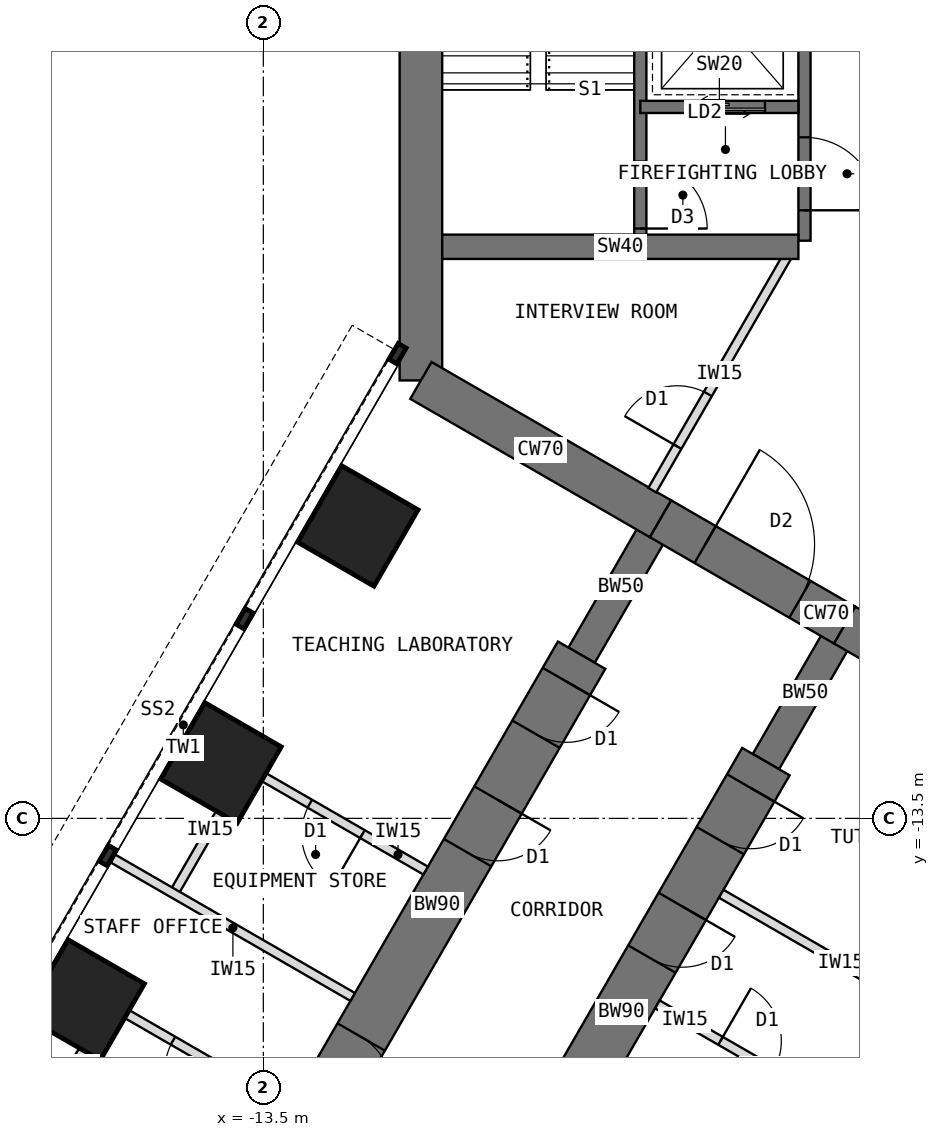
"""IFC4 building model, lengths in metres.
Left out: names, types, materials, properties, quantities, classifications, styles, units other than length and angle.
Written with IfcOpenShell. Run it as: python <this file> out.ifc"""

import sys

from ifc_helpers import new_model, si_unit, direction, frame, frame_2d, origin, origin_2d, place, context, subcontext, project, spatial, rectangle, extrude, element, fill, save


model = new_model("IFC4")
c1 = context("Model", 3, precision=1e-05, world=origin(), true_north=direction((0.0, 1.0)))
c2 = subcontext(c1, "Body", "Model", "MODEL_VIEW")
j1 = project(units=[si_unit("LENGTHUNIT", "METRE"), si_unit("PLANEANGLEUNIT", "RADIAN")], contexts=[c1])
p1 = place(None, origin())
s1 = spatial("IfcSite", under=j1, at=p1, CompositionType="ELEMENT")
p2 = place(p1, origin())
s2 = spatial("IfcBuilding", under=s1, at=p2, CompositionType="ELEMENT")
p3 = place(p2, frame((0.0, 0.0, 64.5)))
s3 = spatial("IfcBuildingStorey", under=s2, at=p3, CompositionType="ELEMENT", Elevation=64.5)
p4 = place(p3, frame((-10.908, 6.298, 0.0), z_axis=(0.0, 0.0, 1.0), x_axis=(0.0, -1.0, 0.0)))
e1 = element("IfcWall", 1, at=p4, inside=s3, PredefinedType="SHEAR", context=c2, shape_type="SweptSolid", body=[
    extrude(rectangle(XDim=12.596, YDim=0.7, at=frame_2d((6.298, 0.0))), origin(), (0.0, 0.0, 1.0), 4.0),
])
p5 = place(p3, frame((-10.908, -6.298, 0.0), z_axis=(0.0, 0.0, 1.0), x_axis=(0.866034513004, -0.499984222037, 0.0)))
e2 = element("IfcWall", 2, at=p5, inside=s3, PredefinedType="SHEAR", context=c2, shape_type="SweptSolid", body=[
    extrude(rectangle(XDim=4.548, YDim=0.7, at=frame_2d((2.274, 0.0))), origin(), (0.0, 0.0, 1.0), 4.0),
])
p6 = place(p3, frame((-6.97, -8.572, 0.0), z_axis=(0.0, 0.0, 1.0), x_axis=(0.866019471182, -0.500010275428, 0.0)))
e3 = element("IfcWall", 3, at=p6, inside=s3, PredefinedType="SHEAR", context=c2, shape_type="SweptSolid", body=[
    extrude(rectangle(XDim=3.5, YDim=0.7, at=frame_2d((1.75, 0.0))), origin(), (0.0, 0.0, 1.0), 4.0),
])
p7 = place(p6, frame((0.85, 0.0, 0.0)))
e4 = element("IfcOpeningElement", 4, at=p7, cuts=e3, PredefinedType="OPENING", context=c2, shape_type="SweptSolid", body=[
    extrude(rectangle(XDim=1.8, YDim=2.1, at=frame_2d((0.9, 1.05))), frame((0.0, 0.36, 0.0), z_axis=(0.0, -1.0, 0.0), x_axis=(1.0, 0.0, 0.0)), (0.0, 0.0, 1.0), 0.72),
])
p8 = place(p3, frame((-3.939, -10.322, 0.0), z_axis=(0.0, 0.0, 1.0), x_axis=(0.866011268655, -0.500024481964, 0.0)))
e5 = element("IfcWall", 5, at=p8, inside=s3, PredefinedType="SHEAR", context=c2, shape_type="SweptSolid", body=[
    extrude(rectangle(XDim=4.548, YDim=0.7, at=frame_2d((2.274, 0.0))), origin(), (0.0, 0.0, 1.0), 4.0),
])
p9 = place(p3, frame((-3.939, -10.322, 0.0), z_axis=(0.0, 0.0, 1.0), x_axis=(-0.499918158782, -0.866072649678, 0.0)))
e6 = element("IfcWall", 6, at=p9, inside=s3, PredefinedType="SHEAR", context=c2, shape_type="SweptSolid", body=[
    extrude(rectangle(XDim=2.592, YDim=0.5, at=frame_2d((1.296, 0.0))), origin(), (0.0, 0.0, 1.0), 4.0),
])
p10 = place(p3, frame((-5.234, -12.566, 0.0), z_axis=(0.0, 0.0, 1.0), x_axis=(-0.499997557548, -0.86602681393, 0.0)))
e7 = element("IfcWall", 7, at=p10, inside=s3, PredefinedType="SHEAR", context=c2, shape_type="SweptSolid", body=[
    extrude(rectangle(XDim=9.5, YDim=0.9, at=frame_2d((4.75, 0.0))), origin(), (0.0, 0.0, 1.0), 4.0),
])
p11 = place(p10, frame((0.5, 0.0, 0.0)))
e8 = element("IfcOpeningElement", 8, at=p11, cuts=e7, PredefinedType="OPENING", context=c2, shape_type="SweptSolid", body=[
    extrude(rectangle(XDim=1.0, YDim=2.1, at=frame_2d((0.5, 1.05))), frame((0.0, 0.46, 0.0), z_axis=(0.0, -1.0, 0.0), x_axis=(1.0, 0.0, 0.0)), (0.0, 0.0, 1.0), 0.92),
])
p12 = place(p10, frame((2.75, 0.0, 0.0)))
e9 = element("IfcOpeningElement", 9, at=p12, cuts=e7, PredefinedType="OPENING", context=c2, shape_type="SweptSolid", body=[
    extrude(rectangle(XDim=1.0, YDim=2.1, at=frame_2d((0.5, 1.05))), frame((0.0, 0.46, 0.0), z_axis=(0.0, -1.0, 0.0), x_axis=(1.0, 0.0, 0.0)), (0.0, 0.0, 1.0), 0.92),
])
p13 = place(p10, frame((7.25, 0.0, 0.0)))
e10 = element("IfcOpeningElement", 10, at=p13, cuts=e7, PredefinedType="OPENING", context=c2, shape_type="SweptSolid", body=[
    extrude(rectangle(XDim=1.0, YDim=2.1, at=frame_2d((0.5, 1.05))), frame((0.0, 0.46, 0.0), z_axis=(0.0, -1.0, 0.0), x_axis=(1.0, 0.0, 0.0)), (0.0, 0.0, 1.0), 0.92),
])
p14 = place(p3, frame((-6.97, -8.572, 0.0), z_axis=(0.0, 0.0, 1.0), x_axis=(-0.499988811324, -0.866031863473, 0.0)))
e11 = element("IfcWall", 11, at=p14, inside=s3, PredefinedType="SHEAR", context=c2, shape_type="SweptSolid", body=[
    extrude(rectangle(XDim=2.592, YDim=0.5, at=frame_2d((1.296, 0.0))), origin(), (0.0, 0.0, 1.0), 4.0),
])
p15 = place(p3, frame((-8.266, -10.816, 0.0), z_axis=(0.0, 0.0, 1.0), x_axis=(-0.499997557548, -0.86602681393, 0.0)))
e12 = element("IfcWall", 12, at=p15, inside=s3, PredefinedType="SHEAR", context=c2, shape_type="SweptSolid", body=[
    extrude(rectangle(XDim=9.5, YDim=0.9, at=frame_2d((4.75, 0.0))), origin(), (0.0, 0.0, 1.0), 4.0),
])
p16 = place(p15, frame((0.5, 0.0, 0.0)))
e13 = element("IfcOpeningElement", 13, at=p16, cuts=e12, PredefinedType="OPENING", context=c2, shape_type="SweptSolid", body=[
    extrude(rectangle(XDim=1.0, YDim=2.1, at=frame_2d((0.5, 1.05))), frame((0.0, 0.46, 0.0), z_axis=(0.0, -1.0, 0.0), x_axis=(1.0, 0.0, 0.0)), (0.0, 0.0, 1.0), 0.92),
])
p17 = place(p15, frame((2.75, 0.0, 0.0)))
e14 = element("IfcOpeningElement", 14, at=p17, cuts=e12, PredefinedType="OPENING", context=c2, shape_type="SweptSolid", body=[
    extrude(rectangle(XDim=1.0, YDim=2.1, at=frame_2d((0.5, 1.05))), frame((0.0, 0.46, 0.0), z_axis=(0.0, -1.0, 0.0), x_axis=(1.0, 0.0, 0.0)), (0.0, 0.0, 1.0), 0.92),
])
p18 = place(p15, frame((7.25, 0.0, 0.0)))
e15 = element("IfcOpeningElement", 15, at=p18, cuts=e12, PredefinedType="OPENING", context=c2, shape_type="SweptSolid", body=[
    extrude(rectangle(XDim=1.0, YDim=2.1, at=frame_2d((0.5, 1.05))), frame((0.0, 0.46, 0.0), z_axis=(0.0, -1.0, 0.0), x_axis=(1.0, 0.0, 0.0)), (0.0, 0.0, 1.0), 0.92),
])
for number, where, z_axis, x_axis in (
    (16, (-11.946, -8.691, 0.0), (0.0, 0.0, 1.0), (0.5, 0.866, 0.0)),
    (17, (-14.196, -12.588, 0.0), (0.0, 0.0, 1.0), (0.5, 0.866, 0.0)),
    (18, (-16.446, -16.486, 0.0), (0.0, 0.0, 1.0), (0.5, 0.866, 0.0)),
):
    element("IfcColumn", number, at=place(p3, frame(where, z_axis=z_axis, x_axis=x_axis)), inside=s3, PredefinedType="COLUMN", context=c2, shape_type="SweptSolid", body=[
        extrude(rectangle(XDim=1.45, YDim=1.45, at=origin_2d()), origin(), (0.0, 0.0, 1.0), 4.0),
    ])
p19 = place(p3, frame((-4.6, 4.0, 0.0), z_axis=(0.0, 0.0, 1.0), x_axis=(0.0, -1.0, 0.0)))
e19 = element("IfcWall", 19, at=p19, inside=s3, PredefinedType="SHEAR", context=c2, shape_type="SweptSolid", body=[
    extrude(rectangle(XDim=8.0, YDim=0.2, at=frame_2d((4.0, 0.0))), origin(), (0.0, 0.0, 1.0), 4.0),
])
p20 = place(p19, frame((6.3, 0.0, 0.0)))
e20 = element("IfcOpeningElement", 20, at=p20, cuts=e19, PredefinedType="OPENING", context=c2, shape_type="SweptSolid", body=[
    extrude(rectangle(XDim=1.2, YDim=2.1, at=frame_2d((0.6, 1.05))), frame((0.0, 0.11, 0.0), z_axis=(0.0, -1.0, 0.0), x_axis=(1.0, 0.0, 0.0)), (0.0, 0.0, 1.0), 0.22),
])
p21 = place(p19, frame((0.9, 0.0, 0.0)))
e21 = element("IfcOpeningElement", 21, at=p21, cuts=e19, PredefinedType="OPENING", context=c2, shape_type="SweptSolid", body=[
    extrude(rectangle(XDim=1.1, YDim=2.2, at=frame_2d((0.55, 1.1))), frame((0.0, 0.11, 0.0), z_axis=(0.0, -1.0, 0.0), x_axis=(1.0, 0.0, 0.0)), (0.0, 0.0, 1.0), 0.22),
])
p22 = place(p3, frame((-4.7, -1.8, 0.0), z_axis=(0.0, 0.0, 1.0), x_axis=(-1.0, 0.0, 0.0)))
e22 = element("IfcWall", 22, at=p22, inside=s3, PredefinedType="SHEAR", context=c2, shape_type="SweptSolid", body=[
    extrude(rectangle(XDim=2.6, YDim=0.2, at=frame_2d((1.3, 0.0))), origin(), (0.0, 0.0, 1.0), 4.0),
])
p23 = place(p22, frame((0.55, 0.0, 0.0)))
e23 = element("IfcOpeningElement", 23, at=p23, cuts=e22, PredefinedType="OPENING", context=c2, shape_type="SweptSolid", body=[
    extrude(rectangle(XDim=1.3, YDim=2.2, at=frame_2d((0.65, 1.1))), frame((0.0, 0.11, 0.0), z_axis=(0.0, -1.0, 0.0), x_axis=(1.0, 0.0, 0.0)), (0.0, 0.0, 1.0), 0.22),
])
p24 = place(p3, frame((-7.3, 4.0, 0.0), z_axis=(0.0, 0.0, 1.0), x_axis=(0.0, -1.0, 0.0)))
e24 = element("IfcWall", 24, at=p24, inside=s3, PredefinedType="SHEAR", context=c2, shape_type="SweptSolid", body=[
    extrude(rectangle(XDim=8.0, YDim=0.2, at=frame_2d((4.0, 0.0))), origin(), (0.0, 0.0, 1.0), 4.0),
])
p25 = place(p24, frame((6.7, 0.0, 0.0)))
e25 = element("IfcOpeningElement", 25, at=p25, cuts=e24, PredefinedType="OPENING", context=c2, shape_type="SweptSolid", body=[
    extrude(rectangle(XDim=1.1, YDim=2.1, at=frame_2d((0.55, 1.05))), frame((0.0, 0.11, 0.0), z_axis=(0.0, -1.0, 0.0), x_axis=(1.0, 0.0, 0.0)), (0.0, 0.0, 1.0), 0.22),
])
p26 = place(p3, frame((-4.7, -4.1, 0.0), z_axis=(0.0, 0.0, 1.0), x_axis=(-1.0, 0.0, 0.0)))
e26 = element("IfcWall", 26, at=p26, inside=s3, PredefinedType="SHEAR", context=c2, shape_type="SweptSolid", body=[
    extrude(rectangle(XDim=5.858, YDim=0.4, at=frame_2d((2.929, 0.0))), origin(), (0.0, 0.0, 1.0), 4.0),
])
p27 = place(p3, frame((-5.97, -14.74, 0.0), z_axis=(0.0, 0.0, 1.0), x_axis=(0.866035472144, -0.499982560684, 0.0)))
e27 = element("IfcWall", 27, at=p27, inside=s3, PredefinedType="PARTITIONING", context=c2, shape_type="SweptSolid", body=[
    extrude(rectangle(XDim=4.55, YDim=0.15, at=frame_2d((2.275, 0.0))), origin(), (0.0, 0.0, 1.0), 3.8),
])
p28 = place(p3, frame((-7.02, -16.559, 0.0), z_axis=(0.0, 0.0, 1.0), x_axis=(0.866038511948, -0.499977295307, 0.0)))
e28 = element("IfcWall", 28, at=p28, inside=s3, PredefinedType="PARTITIONING", context=c2, shape_type="SweptSolid", body=[
    extrude(rectangle(XDim=3.4, YDim=0.15, at=frame_2d((1.7, 0.0))), origin(), (0.0, 0.0, 1.0), 3.8),
])
p29 = place(p28, frame((1.2, 0.0, 0.0)))
e29 = element("IfcOpeningElement", 29, at=p29, cuts=e28, PredefinedType="OPENING", context=c2, shape_type="SweptSolid", body=[
    extrude(rectangle(XDim=1.0, YDim=2.1, at=frame_2d((0.5, 1.05))), frame((0.0, 0.085, 0.0), z_axis=(0.0, -1.0, 0.0), x_axis=(1.0, 0.0, 0.0)), (0.0, 0.0, 1.0), 0.17),
])
p30 = place(p3, frame((-12.03, -16.437, 0.0), z_axis=(0.0, 0.0, 1.0), x_axis=(-0.866035472144, 0.499982560684, 0.0)))
e30 = element("IfcWall", 30, at=p30, inside=s3, PredefinedType="PARTITIONING", context=c2, shape_type="SweptSolid", body=[
    extrude(rectangle(XDim=4.55, YDim=0.15, at=frame_2d((2.275, 0.0))), origin(), (0.0, 0.0, 1.0), 3.8),
])
p31 = place(p3, frame((-13.775, -12.658, 0.0), z_axis=(0.0, 0.0, 1.0), x_axis=(-0.500033551112, -0.866006032174, 0.0)))
e31 = element("IfcWall", 31, at=p31, inside=s3, PredefinedType="PARTITIONING", context=c2, shape_type="SweptSolid", body=[
    extrude(rectangle(XDim=2.4, YDim=0.15, at=frame_2d((1.2, 0.0))), origin(), (0.0, 0.0, 1.0), 3.8),
])
p32 = place(p3, frame((-10.83, -14.359, 0.0), z_axis=(0.0, 0.0, 1.0), x_axis=(-0.865989465428, 0.500062241894, 0.0)))
e32 = element("IfcWall", 32, at=p32, inside=s3, PredefinedType="PARTITIONING", context=c2, shape_type="SweptSolid", body=[
    extrude(rectangle(XDim=3.4, YDim=0.15, at=frame_2d((1.7, 0.0))), origin(), (0.0, 0.0, 1.0), 3.8),
])
p33 = place(p32, frame((1.2, 0.0, 0.0)))
e33 = element("IfcOpeningElement", 33, at=p33, cuts=e32, PredefinedType="OPENING", context=c2, shape_type="SweptSolid", body=[
    extrude(rectangle(XDim=1.0, YDim=2.1, at=frame_2d((0.5, 1.05))), frame((0.0, 0.085, 0.0), z_axis=(0.0, -1.0, 0.0), x_axis=(1.0, 0.0, 0.0)), (0.0, 0.0, 1.0), 0.17),
])
p34 = place(p3, frame((-16.025, -16.556, 0.0), z_axis=(0.0, 0.0, 1.0), x_axis=(-0.500077600433, -0.865980596518, 0.0)))
e34 = element("IfcWall", 34, at=p34, inside=s3, PredefinedType="PARTITIONING", context=c2, shape_type="SweptSolid", body=[
    extrude(rectangle(XDim=2.4, YDim=0.15, at=frame_2d((1.2, 0.0))), origin(), (0.0, 0.0, 1.0), 3.8),
])
p35 = place(p3, frame((-13.08, -18.256, 0.0), z_axis=(0.0, 0.0, 1.0), x_axis=(-0.866020560687, 0.500008388397, 0.0)))
e35 = element("IfcWall", 35, at=p35, inside=s3, PredefinedType="PARTITIONING", context=c2, shape_type="SweptSolid", body=[
    extrude(rectangle(XDim=3.4, YDim=0.15, at=frame_2d((1.7, 0.0))), origin(), (0.0, 0.0, 1.0), 3.8),
])
p36 = place(p35, frame((1.2, 0.0, 0.0)))
e36 = element("IfcOpeningElement", 36, at=p36, cuts=e35, PredefinedType="OPENING", context=c2, shape_type="SweptSolid", body=[
    extrude(rectangle(XDim=1.0, YDim=2.1, at=frame_2d((0.5, 1.05))), frame((0.0, 0.085, 0.0), z_axis=(0.0, -1.0, 0.0), x_axis=(1.0, 0.0, 0.0)), (0.0, 0.0, 1.0), 0.17),
])
p37 = place(p3, frame((-7.103, -8.103, 0.0), z_axis=(0.0, 0.0, 1.0), x_axis=(0.500007369519, 0.866021148949, 0.0)))
e37 = element("IfcWall", 37, at=p37, inside=s3, PredefinedType="PARTITIONING", context=c2, shape_type="SweptSolid", body=[
    extrude(rectangle(XDim=4.426, YDim=0.15, at=frame_2d((2.213, 0.0))), origin(), (0.0, 0.0, 1.0), 3.8),
])
p38 = place(p37, frame((0.828, 0.0, 0.0)))
e38 = element("IfcOpeningElement", 38, at=p38, cuts=e37, PredefinedType="OPENING", context=c2, shape_type="SweptSolid", body=[
    extrude(rectangle(XDim=1.0, YDim=2.1, at=frame_2d((0.5, 1.05))), frame((0.0, 0.085, 0.0), z_axis=(0.0, -1.0, 0.0), x_axis=(1.0, 0.0, 0.0)), (0.0, 0.0, 1.0), 0.17),
])
p39 = place(p20, origin())
e39 = element("IfcDoor", 39, at=p39, inside=s3, OperationType="SINGLE_SWING_RIGHT", PredefinedType="DOOR", context=c2, shape_type="SweptSolid", body=[
    extrude(rectangle(XDim=1.2, YDim=2.1, at=frame_2d((0.6, 1.05))), frame((0.0, 0.025, 0.0), z_axis=(0.0, -1.0, 0.0), x_axis=(1.0, 0.0, 0.0)), (0.0, 0.0, 1.0), 0.05),
])
fill(e20, e39)
p40 = place(p23, origin())
e40 = element("IfcDoor", 40, at=p40, inside=s3, OperationType="DOUBLE_DOOR_SLIDING", PredefinedType="DOOR", context=c2, shape_type="SweptSolid", body=[
    extrude(rectangle(XDim=1.3, YDim=2.2, at=frame_2d((0.65, 1.1))), frame((0.0, 0.025, 0.0), z_axis=(0.0, -1.0, 0.0), x_axis=(1.0, 0.0, 0.0)), (0.0, 0.0, 1.0), 0.05),
])
fill(e23, e40)
p41 = place(p25, origin())
e41 = element("IfcDoor", 41, at=p41, inside=s3, OperationType="SINGLE_SWING_RIGHT", PredefinedType="DOOR", context=c2, shape_type="SweptSolid", body=[
    extrude(rectangle(XDim=1.1, YDim=2.1, at=frame_2d((0.55, 1.05))), frame((0.0, 0.025, 0.0), z_axis=(0.0, -1.0, 0.0), x_axis=(1.0, 0.0, 0.0)), (0.0, 0.0, 1.0), 0.05),
])
fill(e25, e41)
p42 = place(p7, origin())
e42 = element("IfcDoor", 42, at=p42, inside=s3, OperationType="DOUBLE_DOOR_DOUBLE_SWING", PredefinedType="DOOR", context=c2, shape_type="SweptSolid", body=[
    extrude(rectangle(XDim=1.72, YDim=2.06, at=frame_2d((0.9, 1.03))), frame((0.0, 0.025, 0.0), z_axis=(0.0, -1.0, 0.0), x_axis=(1.0, 0.0, 0.0)), (0.0, 0.0, 1.0), 0.05),
    extrude(rectangle(XDim=0.04, YDim=2.1, at=frame_2d((0.02, 1.05))), frame((0.0, 0.35, 0.0), z_axis=(0.0, -1.0, 0.0), x_axis=(1.0, 0.0, 0.0)), (0.0, 0.0, 1.0), 0.699),
    extrude(rectangle(XDim=0.04, YDim=2.1, at=frame_2d((1.78, 1.05))), frame((0.0, 0.35, 0.0), z_axis=(0.0, -1.0, 0.0), x_axis=(1.0, 0.0, 0.0)), (0.0, 0.0, 1.0), 0.699),
    extrude(rectangle(XDim=1.72, YDim=0.04, at=frame_2d((0.9, 2.08))), frame((0.0, 0.35, 0.0), z_axis=(0.0, -1.0, 0.0), x_axis=(1.0, 0.0, 0.0)), (0.0, 0.0, 1.0), 0.699),
])
fill(e4, e42)
p43 = place(p29, origin())
e43 = element("IfcDoor", 43, at=p43, inside=s3, OperationType="SINGLE_SWING_LEFT", PredefinedType="DOOR", context=c2, shape_type="SweptSolid", body=[
    extrude(rectangle(XDim=1.0, YDim=2.1, at=frame_2d((0.5, 1.05))), frame((0.0, 0.025, 0.0), z_axis=(0.0, -1.0, 0.0), x_axis=(1.0, 0.0, 0.0)), (0.0, 0.0, 1.0), 0.05),
])
fill(e29, e43)
p44 = place(p33, origin())
e44 = element("IfcDoor", 44, at=p44, inside=s3, OperationType="SINGLE_SWING_LEFT", PredefinedType="DOOR", context=c2, shape_type="SweptSolid", body=[
    extrude(rectangle(XDim=1.0, YDim=2.1, at=frame_2d((0.5, 1.05))), frame((0.0, 0.025, 0.0), z_axis=(0.0, -1.0, 0.0), x_axis=(1.0, 0.0, 0.0)), (0.0, 0.0, 1.0), 0.05),
])
fill(e33, e44)
p45 = place(p36, origin())
e45 = element("IfcDoor", 45, at=p45, inside=s3, OperationType="SINGLE_SWING_LEFT", PredefinedType="DOOR", context=c2, shape_type="SweptSolid", body=[
    extrude(rectangle(XDim=1.0, YDim=2.1, at=frame_2d((0.5, 1.05))), frame((0.0, 0.025, 0.0), z_axis=(0.0, -1.0, 0.0), x_axis=(1.0, 0.0, 0.0)), (0.0, 0.0, 1.0), 0.05),
])
fill(e36, e45)
p46 = place(p38, origin())
e46 = element("IfcDoor", 46, at=p46, inside=s3, OperationType="SINGLE_SWING_LEFT", PredefinedType="DOOR", context=c2, shape_type="SweptSolid", body=[
    extrude(rectangle(XDim=1.0, YDim=2.1, at=frame_2d((0.5, 1.05))), frame((0.0, 0.025, 0.0), z_axis=(0.0, -1.0, 0.0), x_axis=(1.0, 0.0, 0.0)), (0.0, 0.0, 1.0), 0.05),
])
fill(e38, e46)
p47 = place(p11, origin())
e47 = element("IfcDoor", 47, at=p47, inside=s3, OperationType="SINGLE_SWING_LEFT", PredefinedType="DOOR", context=c2, shape_type="SweptSolid", body=[
    extrude(rectangle(XDim=0.92, YDim=2.06, at=frame_2d((0.5, 1.03))), frame((0.0, 0.025, 0.0), z_axis=(0.0, -1.0, 0.0), x_axis=(1.0, 0.0, 0.0)), (0.0, 0.0, 1.0), 0.05),
    extrude(rectangle(XDim=0.04, YDim=2.1, at=frame_2d((0.02, 1.05))), frame((0.0, 0.45, 0.0), z_axis=(0.0, -1.0, 0.0), x_axis=(1.0, 0.0, 0.0)), (0.0, 0.0, 1.0), 0.899),
    extrude(rectangle(XDim=0.04, YDim=2.1, at=frame_2d((0.98, 1.05))), frame((0.0, 0.45, 0.0), z_axis=(0.0, -1.0, 0.0), x_axis=(1.0, 0.0, 0.0)), (0.0, 0.0, 1.0), 0.899),
    extrude(rectangle(XDim=0.92, YDim=0.04, at=frame_2d((0.5, 2.08))), frame((0.0, 0.45, 0.0), z_axis=(0.0, -1.0, 0.0), x_axis=(1.0, 0.0, 0.0)), (0.0, 0.0, 1.0), 0.899),
])
fill(e8, e47)
p48 = place(p12, origin())
e48 = element("IfcDoor", 48, at=p48, inside=s3, OperationType="SINGLE_SWING_LEFT", PredefinedType="DOOR", context=c2, shape_type="SweptSolid", body=[
    extrude(rectangle(XDim=0.92, YDim=2.06, at=frame_2d((0.5, 1.03))), frame((0.0, 0.025, 0.0), z_axis=(0.0, -1.0, 0.0), x_axis=(1.0, 0.0, 0.0)), (0.0, 0.0, 1.0), 0.05),
    extrude(rectangle(XDim=0.04, YDim=2.1, at=frame_2d((0.02, 1.05))), frame((0.0, 0.45, 0.0), z_axis=(0.0, -1.0, 0.0), x_axis=(1.0, 0.0, 0.0)), (0.0, 0.0, 1.0), 0.899),
    extrude(rectangle(XDim=0.04, YDim=2.1, at=frame_2d((0.98, 1.05))), frame((0.0, 0.45, 0.0), z_axis=(0.0, -1.0, 0.0), x_axis=(1.0, 0.0, 0.0)), (0.0, 0.0, 1.0), 0.899),
    extrude(rectangle(XDim=0.92, YDim=0.04, at=frame_2d((0.5, 2.08))), frame((0.0, 0.45, 0.0), z_axis=(0.0, -1.0, 0.0), x_axis=(1.0, 0.0, 0.0)), (0.0, 0.0, 1.0), 0.899),
])
fill(e9, e48)
p49 = place(p16, origin())
e49 = element("IfcDoor", 49, at=p49, inside=s3, OperationType="SINGLE_SWING_LEFT", PredefinedType="DOOR", context=c2, shape_type="SweptSolid", body=[
    extrude(rectangle(XDim=0.92, YDim=2.06, at=frame_2d((0.5, 1.03))), frame((0.0, 0.025, 0.0), z_axis=(0.0, -1.0, 0.0), x_axis=(1.0, 0.0, 0.0)), (0.0, 0.0, 1.0), 0.05),
    extrude(rectangle(XDim=0.04, YDim=2.1, at=frame_2d((0.02, 1.05))), frame((0.0, 0.45, 0.0), z_axis=(0.0, -1.0, 0.0), x_axis=(1.0, 0.0, 0.0)), (0.0, 0.0, 1.0), 0.899),
    extrude(rectangle(XDim=0.04, YDim=2.1, at=frame_2d((0.98, 1.05))), frame((0.0, 0.45, 0.0), z_axis=(0.0, -1.0, 0.0), x_axis=(1.0, 0.0, 0.0)), (0.0, 0.0, 1.0), 0.899),
    extrude(rectangle(XDim=0.92, YDim=0.04, at=frame_2d((0.5, 2.08))), frame((0.0, 0.45, 0.0), z_axis=(0.0, -1.0, 0.0), x_axis=(1.0, 0.0, 0.0)), (0.0, 0.0, 1.0), 0.899),
])
fill(e13, e49)
p50 = place(p17, origin())
e50 = element("IfcDoor", 50, at=p50, inside=s3, OperationType="SINGLE_SWING_LEFT", PredefinedType="DOOR", context=c2, shape_type="SweptSolid", body=[
    extrude(rectangle(XDim=0.92, YDim=2.06, at=frame_2d((0.5, 1.03))), frame((0.0, 0.025, 0.0), z_axis=(0.0, -1.0, 0.0), x_axis=(1.0, 0.0, 0.0)), (0.0, 0.0, 1.0), 0.05),
    extrude(rectangle(XDim=0.04, YDim=2.1, at=frame_2d((0.02, 1.05))), frame((0.0, 0.45, 0.0), z_axis=(0.0, -1.0, 0.0), x_axis=(1.0, 0.0, 0.0)), (0.0, 0.0, 1.0), 0.899),
    extrude(rectangle(XDim=0.04, YDim=2.1, at=frame_2d((0.98, 1.05))), frame((0.0, 0.45, 0.0), z_axis=(0.0, -1.0, 0.0), x_axis=(1.0, 0.0, 0.0)), (0.0, 0.0, 1.0), 0.899),
    extrude(rectangle(XDim=0.92, YDim=0.04, at=frame_2d((0.5, 2.08))), frame((0.0, 0.45, 0.0), z_axis=(0.0, -1.0, 0.0), x_axis=(1.0, 0.0, 0.0)), (0.0, 0.0, 1.0), 0.899),
])
fill(e14, e50)
p51 = place(p18, origin())
e51 = element("IfcDoor", 51, at=p51, inside=s3, OperationType="SINGLE_SWING_RIGHT", PredefinedType="DOOR", context=c2, shape_type="SweptSolid", body=[
    extrude(rectangle(XDim=0.92, YDim=2.06, at=frame_2d((0.5, 1.03))), frame((0.0, 0.025, 0.0), z_axis=(0.0, -1.0, 0.0), x_axis=(1.0, 0.0, 0.0)), (0.0, 0.0, 1.0), 0.05),
    extrude(rectangle(XDim=0.04, YDim=2.1, at=frame_2d((0.02, 1.05))), frame((0.0, 0.45, 0.0), z_axis=(0.0, -1.0, 0.0), x_axis=(1.0, 0.0, 0.0)), (0.0, 0.0, 1.0), 0.899),
    extrude(rectangle(XDim=0.04, YDim=2.1, at=frame_2d((0.98, 1.05))), frame((0.0, 0.45, 0.0), z_axis=(0.0, -1.0, 0.0), x_axis=(1.0, 0.0, 0.0)), (0.0, 0.0, 1.0), 0.899),
    extrude(rectangle(XDim=0.92, YDim=0.04, at=frame_2d((0.5, 2.08))), frame((0.0, 0.45, 0.0), z_axis=(0.0, -1.0, 0.0), x_axis=(1.0, 0.0, 0.0)), (0.0, 0.0, 1.0), 0.899),
])
fill(e15, e51)
save(model, sys.argv[1])
